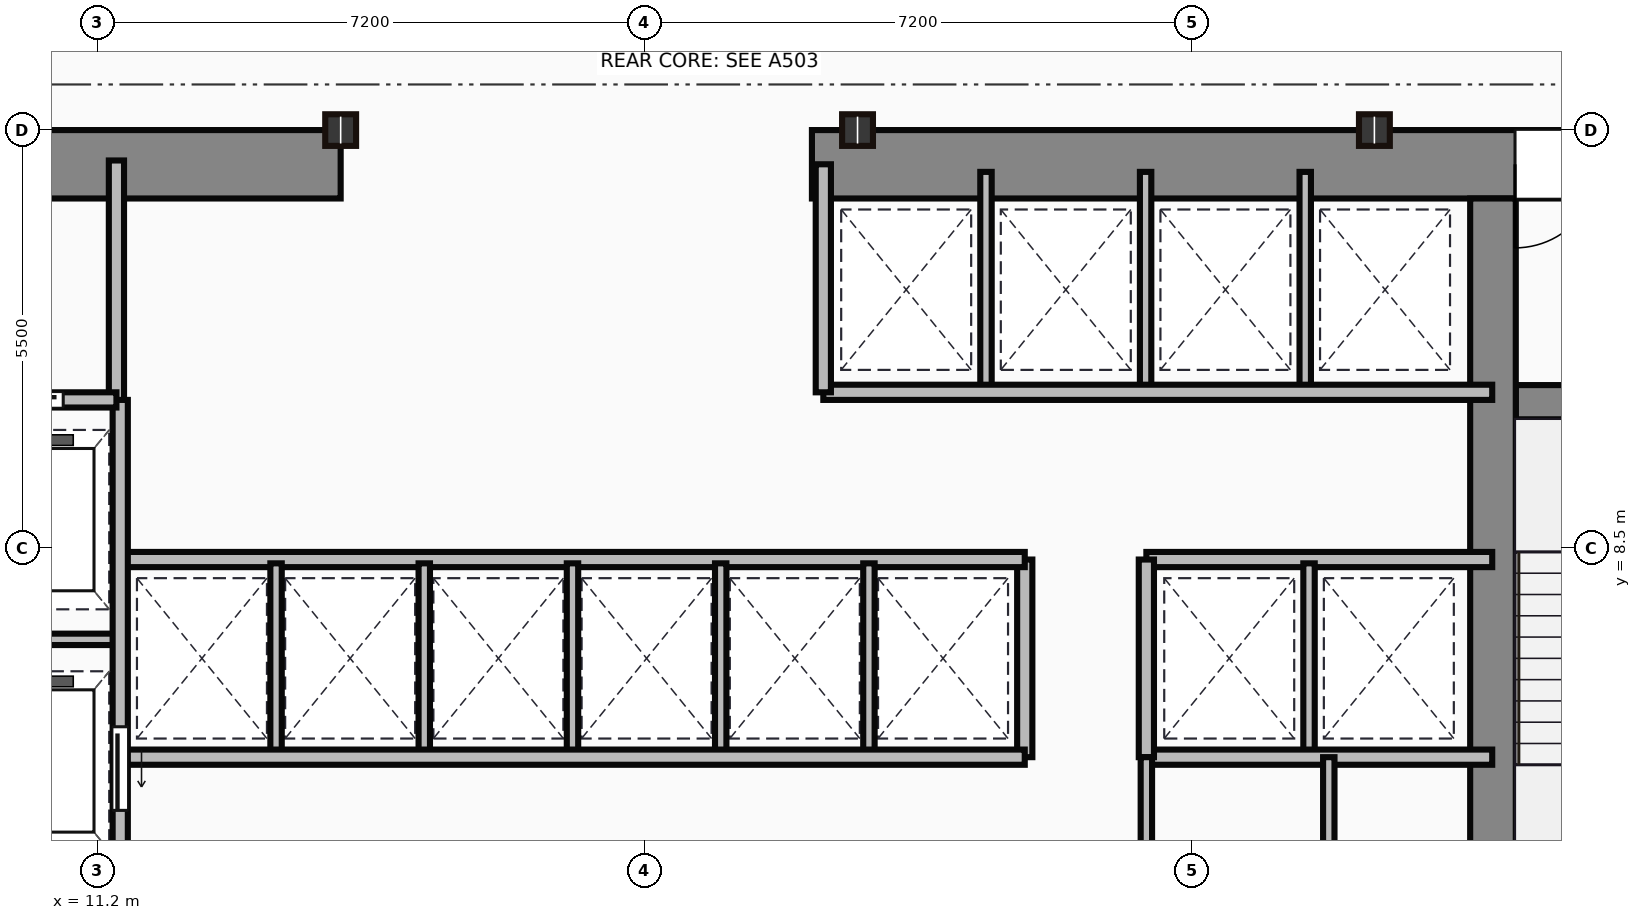
"""IFC4 building model, lengths in metres.
Left out: names, types, materials, properties, quantities, classifications, styles, units other than length and angle.
Written with IfcOpenShell. Run it as: python <this file> out.ifc"""

import sys

from ifc_helpers import new_model, si_unit, direction, frame, frame_2d, origin, origin_2d, place, context, subcontext, project, spatial, rectangle, i_section, extrude, source, transform, mapped, element, fill, save


model = new_model("IFC4")
c1 = context("Model", 3, precision=1e-05, world=origin(), true_north=direction((0.0, 1.0)))
c2 = subcontext(c1, "Body", "Model", "MODEL_VIEW")
j1 = project(units=[si_unit("LENGTHUNIT", "METRE"), si_unit("PLANEANGLEUNIT", "RADIAN")], contexts=[c1])
p1 = place(None, origin())
s1 = spatial("IfcSite", under=j1, at=p1, CompositionType="ELEMENT")
p2 = place(p1, origin())
s2 = spatial("IfcBuilding", under=s1, at=p2, CompositionType="ELEMENT")
p3 = place(p2, frame((0.0, 0.0, 50.75)))
s3 = spatial("IfcBuildingStorey", under=s2, at=p3, CompositionType="ELEMENT", Elevation=50.75)
m1 = source(origin(), c2, "Body", "SweptSolid", [
    extrude(rectangle(XDim=9.1, YDim=0.9, at=frame_2d((4.55, 0.0))), origin(), (0.0, 0.0, 1.0), 3.65),
])
p4 = place(p3, frame((5.3, 13.55, 0.0), z_axis=(0.0, 0.0, 1.0), x_axis=(1.0, 0.0, 0.0)))
e1 = element("IfcWall", 1, at=p4, inside=s3, PredefinedType="SHEAR", context=c2, shape_type="MappedRepresentation", body=[
    mapped(m1, transform((0.0, 0.0, 0.0))),
])
p5 = place(p4, frame((4.1, 0.0, 0.0)))
e2 = element("IfcOpeningElement", 2, at=p5, cuts=e1, PredefinedType="OPENING", context=c2, shape_type="SweptSolid", body=[
    extrude(rectangle(XDim=1.1, YDim=2.15, at=frame_2d((0.55, 1.075))), frame((0.0, 0.46, 0.0), z_axis=(0.0, -1.0, 0.0), x_axis=(1.0, 0.0, 0.0)), (0.0, 0.0, 1.0), 0.92),
])
m2 = source(origin(), c2, "Body", "SweptSolid", [
    extrude(rectangle(XDim=12.6, YDim=0.9, at=frame_2d((6.3, 0.0))), origin(), (0.0, 0.0, 1.0), 3.65),
])
p6 = place(p3, frame((20.6, 13.55, 0.0), z_axis=(0.0, 0.0, 1.0), x_axis=(1.0, 0.0, 0.0)))
e3 = element("IfcWall", 3, at=p6, inside=s3, PredefinedType="SHEAR", context=c2, shape_type="MappedRepresentation", body=[
    mapped(m2, transform((0.0, 0.0, 0.0))),
])
p7 = place(p6, frame((9.25, 0.0, 0.0)))
e4 = element("IfcOpeningElement", 4, at=p7, cuts=e3, PredefinedType="OPENING", context=c2, shape_type="SweptSolid", body=[
    extrude(rectangle(XDim=1.1, YDim=2.15, at=frame_2d((0.55, 1.075))), frame((0.0, 0.46, 0.0), z_axis=(0.0, -1.0, 0.0), x_axis=(1.0, 0.0, 0.0)), (0.0, 0.0, 1.0), 0.92),
])
m3 = source(origin(), c2, "Body", "SweptSolid", [
    extrude(rectangle(XDim=12.2, YDim=0.6, at=frame_2d((6.1, 0.0))), origin(), (0.0, 0.0, 1.0), 3.65),
])
p8 = place(p3, frame((29.56, 0.9, 0.0), z_axis=(0.0, 0.0, 1.0), x_axis=(0.0, 1.0, 0.0)))
e5 = element("IfcWall", 5, at=p8, inside=s3, PredefinedType="SHEAR", context=c2, shape_type="MappedRepresentation", body=[
    mapped(m3, transform((0.0, 0.0, 0.0))),
])
m4 = source(origin(), c2, "Body", "SweptSolid", [
    extrude(rectangle(XDim=3.39, YDim=0.45, at=frame_2d((1.695, 0.0))), origin(), (0.0, 0.0, 1.0), 3.65),
])
p9 = place(p3, frame((29.86, 10.42, 0.0), z_axis=(0.0, 0.0, 1.0), x_axis=(1.0, 0.0, 0.0)))
e6 = element("IfcWall", 6, at=p9, inside=s3, PredefinedType="SHEAR", context=c2, shape_type="MappedRepresentation", body=[
    mapped(m4, transform((0.0, 0.0, 0.0))),
])
p10 = place(p9, frame((1.1, 0.0, 0.0)))
e7 = element("IfcOpeningElement", 7, at=p10, cuts=e6, PredefinedType="OPENING", context=c2, shape_type="SweptSolid", body=[
    extrude(rectangle(XDim=1.1, YDim=2.15, at=frame_2d((0.55, 1.075))), frame((0.0, 0.235, 0.0), z_axis=(0.0, -1.0, 0.0), x_axis=(1.0, 0.0, 0.0)), (0.0, 0.0, 1.0), 0.47),
])
m5 = source(origin(), c2, "Body", "SweptSolid", [
    extrude(i_section(OverallWidth=0.406, OverallDepth=0.416, WebThickness=0.03, FlangeThickness=0.048, at=origin_2d()), origin(), (0.0, 0.0, 1.0), 3.65),
])
for number, where, z_axis, x_axis in (
    (8, (14.4, 14.0, 0.0), (0.0, 0.0, 1.0), (1.0, 0.0, 0.0)),
    (9, (21.2, 14.0, 0.0), (0.0, 0.0, 1.0), (1.0, 0.0, 0.0)),
    (10, (28.0, 14.0, 0.0), (0.0, 0.0, 1.0), (1.0, 0.0, 0.0)),
):
    element("IfcColumn", number, at=place(p3, frame(where, z_axis=z_axis, x_axis=x_axis)), inside=s3, PredefinedType="COLUMN", context=c2, shape_type="MappedRepresentation", body=[
        mapped(m5, transform((0.0, 0.0, 0.0))),
    ])
m6 = source(origin(), c2, "Body", "SweptSolid", [
    extrude(rectangle(XDim=3.18, YDim=0.2, at=frame_2d((1.59, 0.0))), origin(), (0.0, 0.0, 1.0), 3.4),
])
p11 = place(p3, frame((11.45, 10.42, 0.0), z_axis=(0.0, 0.0, 1.0), x_axis=(0.0, 1.0, 0.0)))
e11 = element("IfcWall", 11, at=p11, inside=s3, PredefinedType="PARTITIONING", context=c2, shape_type="MappedRepresentation", body=[
    mapped(m6, transform((0.0, 0.0, 0.0))),
])
m7 = source(origin(), c2, "Body", "SweptSolid", [
    extrude(rectangle(XDim=2.35, YDim=0.2, at=frame_2d((1.175, 0.0))), origin(), (0.0, 0.0, 1.0), 3.4),
])
p12 = place(p3, frame((9.1, 10.45, 0.0), z_axis=(0.0, 0.0, 1.0), x_axis=(1.0, 0.0, 0.0)))
e12 = element("IfcWall", 12, at=p12, inside=s3, PredefinedType="PARTITIONING", context=c2, shape_type="MappedRepresentation", body=[
    mapped(m7, transform((0.0, 0.0, 0.0))),
])
p13 = place(p12, frame((0.55, 0.0, 0.0)))
e13 = element("IfcOpeningElement", 13, at=p13, cuts=e12, PredefinedType="OPENING", context=c2, shape_type="SweptSolid", body=[
    extrude(rectangle(XDim=1.1, YDim=2.15, at=frame_2d((0.55, 1.075))), frame((0.0, 0.11, 0.0), z_axis=(0.0, -1.0, 0.0), x_axis=(1.0, 0.0, 0.0)), (0.0, 0.0, 1.0), 0.22),
])
m8 = source(origin(), c2, "Body", "SweptSolid", [
    extrude(rectangle(XDim=9.6, YDim=0.2, at=frame_2d((4.8, 0.0))), origin(), (0.0, 0.0, 1.0), 3.4),
])
p14 = place(p3, frame((11.5, 0.85, 0.0), z_axis=(0.0, 0.0, 1.0), x_axis=(0.0, 1.0, 0.0)))
e14 = element("IfcWall", 14, at=p14, inside=s3, PredefinedType="PARTITIONING", context=c2, shape_type="MappedRepresentation", body=[
    mapped(m8, transform((0.0, 0.0, 0.0))),
])
p15 = place(p14, frame((4.2, 0.0, 0.0)))
e15 = element("IfcOpeningElement", 15, at=p15, cuts=e14, PredefinedType="OPENING", context=c2, shape_type="SweptSolid", body=[
    extrude(rectangle(XDim=1.1, YDim=2.15, at=frame_2d((0.55, 1.075))), frame((0.0, 0.11, 0.0), z_axis=(0.0, -1.0, 0.0), x_axis=(1.0, 0.0, 0.0)), (0.0, 0.0, 1.0), 0.22),
])
p16 = place(p14, frame((0.9, 0.0, 0.0)))
e16 = element("IfcOpeningElement", 16, at=p16, cuts=e14, PredefinedType="OPENING", context=c2, shape_type="SweptSolid", body=[
    extrude(rectangle(XDim=1.2, YDim=2.15, at=frame_2d((0.6, 1.075))), frame((0.0, 0.11, 0.0), z_axis=(0.0, -1.0, 0.0), x_axis=(1.0, 0.0, 0.0)), (0.0, 0.0, 1.0), 0.22),
])
m9 = source(origin(), c2, "Body", "SweptSolid", [
    extrude(rectangle(XDim=2.4, YDim=0.15, at=frame_2d((1.2, 0.0))), origin(), (0.0, 0.0, 1.0), 3.4),
])
p17 = place(p3, frame((9.1, 7.3, 0.0), z_axis=(0.0, 0.0, 1.0), x_axis=(1.0, 0.0, 0.0)))
e17 = element("IfcWall", 17, at=p17, inside=s3, PredefinedType="PARTITIONING", context=c2, shape_type="MappedRepresentation", body=[
    mapped(m9, transform((0.0, 0.0, 0.0))),
])
m10 = source(origin(), c2, "Body", "SweptSolid", [
    extrude(rectangle(XDim=11.85, YDim=0.2, at=frame_2d((5.925, 0.0))), origin(), (0.0, 0.0, 1.0), 3.4),
])
for number, where, z_axis, x_axis in (
    (18, (11.55, 5.75, 0.0), (0.0, 0.0, 1.0), (1.0, 0.0, 0.0)),
    (19, (11.55, 8.35, 0.0), (0.0, 0.0, 1.0), (1.0, 0.0, 0.0)),
):
    element("IfcWall", number, at=place(p3, frame(where, z_axis=z_axis, x_axis=x_axis)), inside=s3, PredefinedType="PARTITIONING", context=c2, shape_type="MappedRepresentation", body=[
        mapped(m10, transform((0.0, 0.0, 0.0))),
    ])
m11 = source(origin(), c2, "Body", "SweptSolid", [
    extrude(rectangle(XDim=2.6, YDim=0.2, at=frame_2d((1.3, 0.0))), origin(), (0.0, 0.0, 1.0), 3.4),
])
p18 = place(p3, frame((23.4, 5.75, 0.0), z_axis=(0.0, 0.0, 1.0), x_axis=(0.0, 1.0, 0.0)))
e20 = element("IfcWall", 20, at=p18, inside=s3, PredefinedType="PARTITIONING", context=c2, shape_type="MappedRepresentation", body=[
    mapped(m11, transform((0.0, 0.0, 0.0))),
])
m12 = source(origin(), c2, "Body", "SweptSolid", [
    extrude(rectangle(XDim=2.5, YDim=0.15, at=frame_2d((1.25, 0.0))), origin(), (0.0, 0.0, 1.0), 3.4),
])
for number, where, z_axis, x_axis in (
    (21, (13.55, 5.8, 0.0), (0.0, 0.0, 1.0), (0.0, 1.0, 0.0)),
    (22, (15.5, 5.8, 0.0), (0.0, 0.0, 1.0), (0.0, 1.0, 0.0)),
    (23, (17.45, 5.8, 0.0), (0.0, 0.0, 1.0), (0.0, 1.0, 0.0)),
    (24, (19.4, 5.8, 0.0), (0.0, 0.0, 1.0), (0.0, 1.0, 0.0)),
    (25, (21.35, 5.8, 0.0), (0.0, 0.0, 1.0), (0.0, 1.0, 0.0)),
):
    element("IfcWall", number, at=place(p3, frame(where, z_axis=z_axis, x_axis=x_axis)), inside=s3, PredefinedType="PARTITIONING", context=c2, shape_type="MappedRepresentation", body=[
        mapped(m12, transform((0.0, 0.0, 0.0))),
    ])
m13 = source(origin(), c2, "Body", "SweptSolid", [
    extrude(rectangle(XDim=8.8, YDim=0.2, at=frame_2d((4.4, 0.0))), origin(), (0.0, 0.0, 1.0), 3.4),
])
p19 = place(p3, frame((20.75, 10.55, 0.0), z_axis=(0.0, 0.0, 1.0), x_axis=(1.0, 0.0, 0.0)))
e26 = element("IfcWall", 26, at=p19, inside=s3, PredefinedType="PARTITIONING", context=c2, shape_type="MappedRepresentation", body=[
    mapped(m13, transform((0.0, 0.0, 0.0))),
])
m14 = source(origin(), c2, "Body", "SweptSolid", [
    extrude(rectangle(XDim=3.0, YDim=0.2, at=frame_2d((1.5, 0.0))), origin(), (0.0, 0.0, 1.0), 3.4),
])
p20 = place(p3, frame((20.75, 10.55, 0.0), z_axis=(0.0, 0.0, 1.0), x_axis=(0.0, 1.0, 0.0)))
e27 = element("IfcWall", 27, at=p20, inside=s3, PredefinedType="PARTITIONING", context=c2, shape_type="MappedRepresentation", body=[
    mapped(m14, transform((0.0, 0.0, 0.0))),
])
m15 = source(origin(), c2, "Body", "SweptSolid", [
    extrude(rectangle(XDim=2.85, YDim=0.15, at=frame_2d((1.425, 0.0))), origin(), (0.0, 0.0, 1.0), 3.4),
])
for number, where, z_axis, x_axis in (
    (28, (22.89, 10.6, 0.0), (0.0, 0.0, 1.0), (0.0, 1.0, 0.0)),
    (29, (24.99, 10.6, 0.0), (0.0, 0.0, 1.0), (0.0, 1.0, 0.0)),
    (30, (27.09, 10.6, 0.0), (0.0, 0.0, 1.0), (0.0, 1.0, 0.0)),
):
    element("IfcWall", number, at=place(p3, frame(where, z_axis=z_axis, x_axis=x_axis)), inside=s3, PredefinedType="PARTITIONING", context=c2, shape_type="MappedRepresentation", body=[
        mapped(m15, transform((0.0, 0.0, 0.0))),
    ])
m16 = source(origin(), c2, "Body", "SweptSolid", [
    extrude(rectangle(XDim=4.55, YDim=0.2, at=frame_2d((2.275, 0.0))), origin(), (0.0, 0.0, 1.0), 3.4),
])
for number, where, z_axis, x_axis in (
    (31, (25.0, 8.35, 0.0), (0.0, 0.0, 1.0), (1.0, 0.0, 0.0)),
    (32, (25.0, 5.75, 0.0), (0.0, 0.0, 1.0), (1.0, 0.0, 0.0)),
):
    element("IfcWall", number, at=place(p3, frame(where, z_axis=z_axis, x_axis=x_axis)), inside=s3, PredefinedType="PARTITIONING", context=c2, shape_type="MappedRepresentation", body=[
        mapped(m16, transform((0.0, 0.0, 0.0))),
    ])
p21 = place(p3, frame((25.0, 5.75, 0.0), z_axis=(0.0, 0.0, 1.0), x_axis=(0.0, 1.0, 0.0)))
e33 = element("IfcWall", 33, at=p21, inside=s3, PredefinedType="PARTITIONING", context=c2, shape_type="MappedRepresentation", body=[
    mapped(m11, transform((0.0, 0.0, 0.0))),
])
p22 = place(p3, frame((27.14, 5.8, 0.0), z_axis=(0.0, 0.0, 1.0), x_axis=(0.0, 1.0, 0.0)))
e34 = element("IfcWall", 34, at=p22, inside=s3, PredefinedType="PARTITIONING", context=c2, shape_type="MappedRepresentation", body=[
    mapped(m12, transform((0.0, 0.0, 0.0))),
])
m17 = source(origin(), c2, "Body", "SweptSolid", [
    extrude(rectangle(XDim=4.9, YDim=0.15, at=frame_2d((2.45, 0.0))), origin(), (0.0, 0.0, 1.0), 3.4),
])
p23 = place(p3, frame((25.0, 0.85, 0.0), z_axis=(0.0, 0.0, 1.0), x_axis=(0.0, 1.0, 0.0)))
e35 = element("IfcWall", 35, at=p23, inside=s3, PredefinedType="PARTITIONING", context=c2, shape_type="MappedRepresentation", body=[
    mapped(m17, transform((0.0, 0.0, 0.0))),
])
p24 = place(p23, frame((2.5, 0.0, 0.0)))
e36 = element("IfcOpeningElement", 36, at=p24, cuts=e35, PredefinedType="OPENING", context=c2, shape_type="SweptSolid", body=[
    extrude(rectangle(XDim=0.95, YDim=2.15, at=frame_2d((0.475, 1.075))), frame((0.0, 0.085, 0.0), z_axis=(0.0, -1.0, 0.0), x_axis=(1.0, 0.0, 0.0)), (0.0, 0.0, 1.0), 0.17),
])
m18 = source(origin(), c2, "Body", "SweptSolid", [
    extrude(rectangle(XDim=3.4, YDim=0.15, at=frame_2d((1.7, 0.0))), origin(), (0.0, 0.0, 1.0), 3.4),
])
p25 = place(p3, frame((27.4, 2.35, 0.0), z_axis=(0.0, 0.0, 1.0), x_axis=(0.0, 1.0, 0.0)))
e37 = element("IfcWall", 37, at=p25, inside=s3, PredefinedType="PARTITIONING", context=c2, shape_type="MappedRepresentation", body=[
    mapped(m18, transform((0.0, 0.0, 0.0))),
])
p26 = place(p25, frame((1.1, 0.0, 0.0)))
e38 = element("IfcOpeningElement", 38, at=p26, cuts=e37, PredefinedType="OPENING", context=c2, shape_type="SweptSolid", body=[
    extrude(rectangle(XDim=0.85, YDim=2.1, at=frame_2d((0.425, 1.05))), frame((0.0, 0.085, 0.0), z_axis=(0.0, -1.0, 0.0), x_axis=(1.0, 0.0, 0.0)), (0.0, 0.0, 1.0), 0.17),
])
m19 = source(origin(), c2, "Body", "SweptSolid", [
    extrude(rectangle(XDim=1.1, YDim=2.15, at=frame_2d((0.55, 1.075))), frame((0.0, 0.025, 0.0), z_axis=(0.0, -1.0, 0.0), x_axis=(1.0, 0.0, 0.0)), (0.0, 0.0, 1.0), 0.05),
])
p27 = place(p7, origin())
e39 = element("IfcDoor", 39, at=p27, inside=s3, OperationType="SINGLE_SWING_LEFT", PredefinedType="DOOR", context=c2, shape_type="MappedRepresentation", body=[
    mapped(m19, transform((0.0, 0.0, 0.0))),
])
fill(e4, e39)
p28 = place(p13, origin())
e40 = element("IfcDoor", 40, at=p28, inside=s3, OperationType="SLIDING_TO_LEFT", PredefinedType="DOOR", context=c2, shape_type="MappedRepresentation", body=[
    mapped(m19, transform((0.0, 0.0, 0.0))),
])
fill(e13, e40)
p29 = place(p15, frame((1.1, 0.0, 0.0), z_axis=(0.0, 0.0, 1.0), x_axis=(-1.0, 0.0, 0.0)))
e41 = element("IfcDoor", 41, at=p29, inside=s3, OperationType="SLIDING_TO_LEFT", PredefinedType="DOOR", context=c2, shape_type="MappedRepresentation", body=[
    mapped(m19, transform((0.0, 0.0, 0.0))),
])
fill(e15, e41)
save(model, sys.argv[1])
